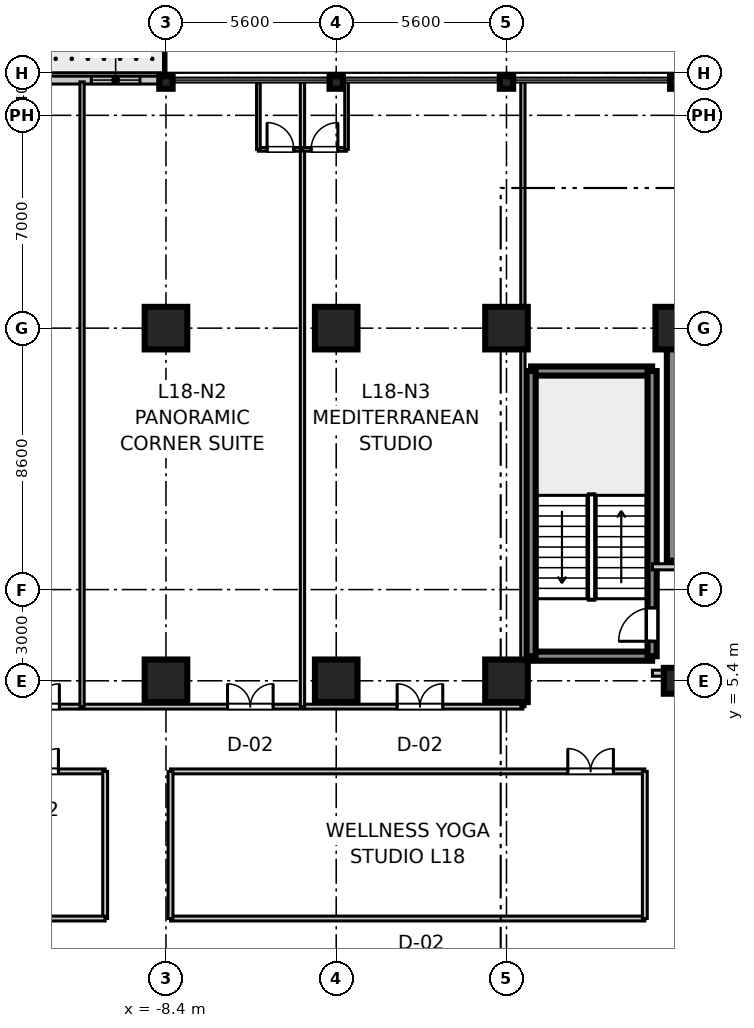
"""IFC4 building model, lengths in metres.
Left out: names, types, materials, properties, quantities, classifications, styles, units other than length and angle.
Written with IfcOpenShell. Run it as: python <this file> out.ifc"""

import sys

from ifc_helpers import new_model, si_unit, direction, frame, frame_2d, origin, origin_2d, place, context, subcontext, project, spatial, rectangle, i_section, extrude, source, transform, mapped, element, fill, save


model = new_model("IFC4")
c1 = context("Model", 3, precision=1e-05, world=origin(), true_north=direction((0.0, 1.0)))
c2 = subcontext(c1, "Body", "Model", "MODEL_VIEW")
j1 = project(units=[si_unit("LENGTHUNIT", "METRE"), si_unit("PLANEANGLEUNIT", "RADIAN")], contexts=[c1])
p1 = place(None, origin())
s1 = spatial("IfcSite", under=j1, at=p1, CompositionType="ELEMENT")
p2 = place(p1, origin())
s2 = spatial("IfcBuilding", under=s1, at=p2, CompositionType="ELEMENT")
p3 = place(p2, frame((0.0, 0.0, 76.2)))
s3 = spatial("IfcBuildingStorey", under=s2, at=p3, CompositionType="ELEMENT", Elevation=76.2)
m1 = source(origin(), c2, "Body", "SweptSolid", [
    extrude(rectangle(XDim=1.4, YDim=1.4, at=origin_2d()), origin(), (0.0, 0.0, 1.0), 3.605),
])
for number, where, z_axis, x_axis in (
    (1, (-8.4, 5.4, 0.0), (0.0, 0.0, 1.0), (1.0, 0.0, 0.0)),
    (2, (-8.4, 17.0, 0.0), (0.0, 0.0, 1.0), (1.0, 0.0, 0.0)),
    (3, (-2.8, 5.4, 0.0), (0.0, 0.0, 1.0), (1.0, 0.0, 0.0)),
    (4, (-2.8, 17.0, 0.0), (0.0, 0.0, 1.0), (1.0, 0.0, 0.0)),
    (5, (2.8, 5.4, 0.0), (0.0, 0.0, 1.0), (1.0, 0.0, 0.0)),
    (6, (2.8, 17.0, 0.0), (0.0, 0.0, 1.0), (1.0, 0.0, 0.0)),
):
    element("IfcColumn", number, at=place(p3, frame(where, z_axis=z_axis, x_axis=x_axis)), inside=s3, PredefinedType="COLUMN", context=c2, shape_type="MappedRepresentation", body=[
        mapped(m1, transform((0.0, 0.0, 0.0), scale=1.0)),
    ])
m2 = source(origin(), c2, "Body", "SweptSolid", [
    extrude(rectangle(XDim=0.85, YDim=0.85, at=origin_2d()), origin(), (0.0, 0.0, 1.0), 3.605),
])
p4 = place(p3, frame((8.4, 5.4, 0.0), z_axis=(0.0, 0.0, 1.0), x_axis=(1.0, 0.0, 0.0)))
e7 = element("IfcColumn", 7, at=p4, inside=s3, PredefinedType="PILASTER", context=c2, shape_type="MappedRepresentation", body=[
    mapped(m2, transform((0.0, 0.0, 0.0), scale=1.0)),
])
p5 = place(p3, frame((8.4, 17.0, 0.0), z_axis=(0.0, 0.0, 1.0), x_axis=(1.0, 0.0, 0.0)))
e8 = element("IfcColumn", 8, at=p5, inside=s3, PredefinedType="COLUMN", context=c2, shape_type="MappedRepresentation", body=[
    mapped(m1, transform((0.0, 0.0, 0.0), scale=1.0)),
])
m3 = source(origin(), c2, "Body", "SweptSolid", [
    extrude(i_section(OverallWidth=0.412, OverallDepth=0.438, WebThickness=0.023, FlangeThickness=0.036, at=origin_2d()), origin(), (0.0, 0.0, 1.0), 3.505),
])
for number, where, z_axis, x_axis in (
    (9, (-8.4, 25.08, 0.0), (0.0, 0.0, 1.0), (0.0, 1.0, 0.0)),
    (10, (-2.8, 25.08, 0.0), (0.0, 0.0, 1.0), (0.0, 1.0, 0.0)),
    (11, (2.8, 25.08, 0.0), (0.0, 0.0, 1.0), (0.0, 1.0, 0.0)),
    (12, (8.4, 25.08, 0.0), (0.0, 0.0, 1.0), (0.0, 1.0, 0.0)),
):
    element("IfcColumn", number, at=place(p3, frame(where, z_axis=z_axis, x_axis=x_axis)), inside=s3, PredefinedType="COLUMN", context=c2, shape_type="MappedRepresentation", body=[
        mapped(m3, transform((0.0, 0.0, 0.0), scale=1.0)),
    ])
m4 = source(origin(), c2, "Body", "SweptSolid", [
    extrude(rectangle(XDim=7.65, YDim=0.65, at=frame_2d((3.825, 0.0))), origin(), (0.0, 0.0, 1.0), 3.37),
])
p6 = place(p3, frame((8.4, 9.35, 0.0), z_axis=(0.0, 0.0, 1.0), x_axis=(0.0, 1.0, 0.0)))
e13 = element("IfcWall", 13, at=p6, inside=s3, PredefinedType="SHEAR", context=c2, shape_type="MappedRepresentation", body=[
    mapped(m4, transform((0.0, 0.0, 0.0), scale=1.0)),
])
m5 = source(origin(), c2, "Body", "SweptSolid", [
    extrude(rectangle(XDim=3.98, YDim=0.3, at=frame_2d((1.99, 0.0))), origin(), (0.0, 0.0, 1.0), 3.37),
])
for number, where, z_axis, x_axis in (
    (14, (3.61, 6.21, 0.0), (0.0, 0.0, 1.0), (1.0, 0.0, 0.0)),
    (15, (3.61, 15.59, 0.0), (0.0, 0.0, 1.0), (1.0, 0.0, 0.0)),
):
    element("IfcWall", number, at=place(p3, frame(where, z_axis=z_axis, x_axis=x_axis)), inside=s3, PredefinedType="SHEAR", context=c2, shape_type="MappedRepresentation", body=[
        mapped(m5, transform((0.0, 0.0, 0.0), scale=1.0)),
    ])
m6 = source(origin(), c2, "Body", "SweptSolid", [
    extrude(rectangle(XDim=9.38, YDim=0.3, at=frame_2d((4.69, 0.0))), origin(), (0.0, 0.0, 1.0), 3.37),
])
p7 = place(p3, frame((3.61, 6.21, 0.0), z_axis=(0.0, 0.0, 1.0), x_axis=(0.0, 1.0, 0.0)))
e16 = element("IfcWall", 16, at=p7, inside=s3, PredefinedType="SHEAR", context=c2, shape_type="MappedRepresentation", body=[
    mapped(m6, transform((0.0, 0.0, 0.0), scale=1.0)),
])
p8 = place(p3, frame((7.59, 6.21, 0.0), z_axis=(0.0, 0.0, 1.0), x_axis=(0.0, 1.0, 0.0)))
e17 = element("IfcWall", 17, at=p8, inside=s3, PredefinedType="SHEAR", context=c2, shape_type="MappedRepresentation", body=[
    mapped(m6, transform((0.0, 0.0, 0.0), scale=1.0)),
])
p9 = place(p8, frame((0.49, 0.0, 0.0)))
e18 = element("IfcOpeningElement", 18, at=p9, cuts=e17, PredefinedType="OPENING", context=c2, shape_type="SweptSolid", body=[
    extrude(rectangle(XDim=1.1, YDim=2.15, at=frame_2d((0.55, 1.075))), frame((0.0, 0.16, 0.0), z_axis=(0.0, -1.0, 0.0), x_axis=(1.0, 0.0, 0.0)), (0.0, 0.0, 1.0), 0.32),
])
m7 = source(origin(), c2, "Body", "SweptSolid", [
    extrude(rectangle(XDim=8.6, YDim=0.26, at=frame_2d((4.3, 0.0))), origin(), (0.0, 0.0, 1.0), 2.85),
])
p10 = place(p3, frame((-17.0, 25.16, 0.0), z_axis=(0.0, 0.0, 1.0), x_axis=(1.0, 0.0, 0.0)))
e19 = element("IfcWall", 19, at=p10, inside=s3, PredefinedType="STANDARD", context=c2, shape_type="MappedRepresentation", body=[
    mapped(m7, transform((0.0, 0.0, 0.0), scale=1.0)),
])
p11 = place(p10, frame((2.295, 0.0, 0.0)))
e20 = element("IfcOpeningElement", 20, at=p11, cuts=e19, PredefinedType="OPENING", context=c2, shape_type="SweptSolid", body=[
    extrude(rectangle(XDim=1.8, YDim=2.25, at=frame_2d((0.9, 1.125))), frame((0.0, 0.14, 0.0), z_axis=(0.0, -1.0, 0.0), x_axis=(1.0, 0.0, 0.0)), (0.0, 0.0, 1.0), 0.28),
])
p12 = place(p10, frame((6.145, 0.0, 0.85)))
e21 = element("IfcOpeningElement", 21, at=p12, cuts=e19, PredefinedType="OPENING", context=c2, shape_type="SweptSolid", body=[
    extrude(rectangle(XDim=1.6, YDim=1.8, at=frame_2d((0.8, 0.9))), frame((0.0, 0.14, 0.0), z_axis=(0.0, -1.0, 0.0), x_axis=(1.0, 0.0, 0.0)), (0.0, 0.0, 1.0), 0.28),
])
m8 = source(origin(), c2, "Body", "SweptSolid", [
    extrude(rectangle(XDim=3.82, YDim=0.2, at=frame_2d((1.91, 0.0))), origin(), (0.0, 0.0, 1.0), 2.71),
])
p13 = place(p3, frame((7.6, 5.65, 0.0), z_axis=(0.0, 0.0, 1.0), x_axis=(1.0, 0.0, 0.0)))
e22 = element("IfcWall", 22, at=p13, inside=s3, PredefinedType="PARTITIONING", context=c2, shape_type="MappedRepresentation", body=[
    mapped(m8, transform((0.0, 0.0, 0.0), scale=1.0)),
])
m9 = source(origin(), c2, "Body", "SweptSolid", [
    extrude(rectangle(XDim=1.9, YDim=0.2, at=frame_2d((0.95, 0.0))), origin(), (0.0, 0.0, 1.0), 2.71),
])
p14 = place(p3, frame((7.6, 9.15, 0.0), z_axis=(0.0, 0.0, 1.0), x_axis=(1.0, 0.0, 0.0)))
e23 = element("IfcWall", 23, at=p14, inside=s3, PredefinedType="PARTITIONING", context=c2, shape_type="MappedRepresentation", body=[
    mapped(m9, transform((0.0, 0.0, 0.0), scale=1.0)),
])
m10 = source(origin(), c2, "Body", "SweptSolid", [
    extrude(rectangle(XDim=25.7, YDim=0.16, at=frame_2d((12.85, 0.0))), origin(), (0.0, 0.0, 1.0), 2.71),
])
p15 = place(p3, frame((-22.36, 4.55, 0.0), z_axis=(0.0, 0.0, 1.0), x_axis=(1.0, 0.0, 0.0)))
e24 = element("IfcWall", 24, at=p15, inside=s3, PredefinedType="PARTITIONING", context=c2, shape_type="MappedRepresentation", body=[
    mapped(m10, transform((0.0, 0.0, 0.0), scale=1.0)),
])
p16 = place(p15, frame((8.954, 0.0, 0.0)))
e25 = element("IfcOpeningElement", 25, at=p16, cuts=e24, PredefinedType="OPENING", context=c2, shape_type="SweptSolid", body=[
    extrude(rectangle(XDim=1.5, YDim=2.15, at=frame_2d((0.75, 1.075))), frame((0.0, 0.09, 0.0), z_axis=(0.0, -1.0, 0.0), x_axis=(1.0, 0.0, 0.0)), (0.0, 0.0, 1.0), 0.18),
])
p17 = place(p15, frame((15.985, 0.0, 0.0)))
e26 = element("IfcOpeningElement", 26, at=p17, cuts=e24, PredefinedType="OPENING", context=c2, shape_type="SweptSolid", body=[
    extrude(rectangle(XDim=1.5, YDim=2.15, at=frame_2d((0.75, 1.075))), frame((0.0, 0.09, 0.0), z_axis=(0.0, -1.0, 0.0), x_axis=(1.0, 0.0, 0.0)), (0.0, 0.0, 1.0), 0.18),
])
p18 = place(p15, frame((21.564, 0.0, 0.0)))
e27 = element("IfcOpeningElement", 27, at=p18, cuts=e24, PredefinedType="OPENING", context=c2, shape_type="SweptSolid", body=[
    extrude(rectangle(XDim=1.5, YDim=2.15, at=frame_2d((0.75, 1.075))), frame((0.0, 0.09, 0.0), z_axis=(0.0, -1.0, 0.0), x_axis=(1.0, 0.0, 0.0)), (0.0, 0.0, 1.0), 0.18),
])
m11 = source(origin(), c2, "Body", "SweptSolid", [
    extrude(rectangle(XDim=20.55, YDim=0.14, at=frame_2d((10.275, 0.0))), origin(), (0.0, 0.0, 1.0), 2.71),
])
for number, where, z_axis, x_axis in (
    (28, (3.34, 4.55, 0.0), (0.0, 0.0, 1.0), (0.0, 1.0, 0.0)),
    (29, (-11.16, 4.55, 0.0), (0.0, 0.0, 1.0), (0.0, 1.0, 0.0)),
):
    element("IfcWall", number, at=place(p3, frame(where, z_axis=z_axis, x_axis=x_axis)), inside=s3, PredefinedType="PARTITIONING", context=c2, shape_type="MappedRepresentation", body=[
        mapped(m11, transform((0.0, 0.0, 0.0), scale=1.0)),
    ])
m12 = source(origin(), c2, "Body", "SweptSolid", [
    extrude(rectangle(XDim=1.45, YDim=0.12, at=frame_2d((0.725, 0.0))), origin(), (0.0, 0.0, 1.0), 2.71),
])
p19 = place(p3, frame((-5.36, 22.88, 0.0), z_axis=(0.0, 0.0, 1.0), x_axis=(1.0, 0.0, 0.0)))
e30 = element("IfcWall", 30, at=p19, inside=s3, PredefinedType="PARTITIONING", context=c2, shape_type="MappedRepresentation", body=[
    mapped(m12, transform((0.0, 0.0, 0.0), scale=1.0)),
])
p20 = place(p19, frame((0.285, 0.0, 0.0)))
e31 = element("IfcOpeningElement", 31, at=p20, cuts=e30, PredefinedType="OPENING", context=c2, shape_type="SweptSolid", body=[
    extrude(rectangle(XDim=0.88, YDim=2.1, at=frame_2d((0.44, 1.05))), frame((0.0, 0.07, 0.0), z_axis=(0.0, -1.0, 0.0), x_axis=(1.0, 0.0, 0.0)), (0.0, 0.0, 1.0), 0.14),
])
m13 = source(origin(), c2, "Body", "SweptSolid", [
    extrude(rectangle(XDim=2.22, YDim=0.12, at=frame_2d((1.11, 0.0))), origin(), (0.0, 0.0, 1.0), 2.71),
])
p21 = place(p3, frame((-5.36, 22.88, 0.0), z_axis=(0.0, 0.0, 1.0), x_axis=(0.0, 1.0, 0.0)))
e32 = element("IfcWall", 32, at=p21, inside=s3, PredefinedType="PARTITIONING", context=c2, shape_type="MappedRepresentation", body=[
    mapped(m13, transform((0.0, 0.0, 0.0), scale=1.0)),
])
p22 = place(p3, frame((-3.91, 4.55, 0.0), z_axis=(0.0, 0.0, 1.0), x_axis=(0.0, 1.0, 0.0)))
e33 = element("IfcWall", 33, at=p22, inside=s3, PredefinedType="PARTITIONING", context=c2, shape_type="MappedRepresentation", body=[
    mapped(m11, transform((0.0, 0.0, 0.0), scale=1.0)),
])
m14 = source(origin(), c2, "Body", "SweptSolid", [
    extrude(rectangle(XDim=1.45, YDim=0.12, at=frame_2d((0.725, 0.0))), origin(), (0.0, 0.0, 1.0), 2.71),
])
p23 = place(p3, frame((-3.91, 22.88, 0.0), z_axis=(0.0, 0.0, 1.0), x_axis=(1.0, 0.0, 0.0)))
e34 = element("IfcWall", 34, at=p23, inside=s3, PredefinedType="PARTITIONING", context=c2, shape_type="MappedRepresentation", body=[
    mapped(m14, transform((0.0, 0.0, 0.0), scale=1.0)),
])
p24 = place(p23, frame((0.285, 0.0, 0.0)))
e35 = element("IfcOpeningElement", 35, at=p24, cuts=e34, PredefinedType="OPENING", context=c2, shape_type="SweptSolid", body=[
    extrude(rectangle(XDim=0.88, YDim=2.1, at=frame_2d((0.44, 1.05))), frame((0.0, 0.07, 0.0), z_axis=(0.0, -1.0, 0.0), x_axis=(1.0, 0.0, 0.0)), (0.0, 0.0, 1.0), 0.14),
])
p25 = place(p3, frame((-2.46, 22.88, 0.0), z_axis=(0.0, 0.0, 1.0), x_axis=(0.0, 1.0, 0.0)))
e36 = element("IfcWall", 36, at=p25, inside=s3, PredefinedType="PARTITIONING", context=c2, shape_type="MappedRepresentation", body=[
    mapped(m13, transform((0.0, 0.0, 0.0), scale=1.0)),
])
m15 = source(origin(), c2, "Body", "SweptSolid", [
    extrude(rectangle(XDim=14.7, YDim=0.16, at=frame_2d((7.35, 0.0))), origin(), (0.0, 0.0, 1.0), 2.71),
])
p26 = place(p3, frame((-25.1, 2.42, 0.0), z_axis=(0.0, 0.0, 1.0), x_axis=(1.0, 0.0, 0.0)))
e37 = element("IfcWall", 37, at=p26, inside=s3, PredefinedType="PARTITIONING", context=c2, shape_type="MappedRepresentation", body=[
    mapped(m15, transform((0.0, 0.0, 0.0), scale=1.0)),
])
p27 = place(p26, frame((11.663, 0.0, 0.0)))
e38 = element("IfcOpeningElement", 38, at=p27, cuts=e37, PredefinedType="OPENING", context=c2, shape_type="SweptSolid", body=[
    extrude(rectangle(XDim=1.5, YDim=2.15, at=frame_2d((0.75, 1.075))), frame((0.0, 0.09, 0.0), z_axis=(0.0, -1.0, 0.0), x_axis=(1.0, 0.0, 0.0)), (0.0, 0.0, 1.0), 0.18),
])
m16 = source(origin(), c2, "Body", "SweptSolid", [
    extrude(rectangle(XDim=4.84, YDim=0.16, at=frame_2d((2.42, 0.0))), origin(), (0.0, 0.0, 1.0), 2.71),
])
p28 = place(p3, frame((-10.4, -2.42, 0.0), z_axis=(0.0, 0.0, 1.0), x_axis=(0.0, 1.0, 0.0)))
e39 = element("IfcWall", 39, at=p28, inside=s3, PredefinedType="PARTITIONING", context=c2, shape_type="MappedRepresentation", body=[
    mapped(m16, transform((0.0, 0.0, 0.0), scale=1.0)),
])
p29 = place(p3, frame((-25.1, -2.42, 0.0), z_axis=(0.0, 0.0, 1.0), x_axis=(1.0, 0.0, 0.0)))
e40 = element("IfcWall", 40, at=p29, inside=s3, PredefinedType="PARTITIONING", context=c2, shape_type="MappedRepresentation", body=[
    mapped(m15, transform((0.0, 0.0, 0.0), scale=1.0)),
])
m17 = source(origin(), c2, "Body", "SweptSolid", [
    extrude(rectangle(XDim=15.6, YDim=0.16, at=frame_2d((7.8, 0.0))), origin(), (0.0, 0.0, 1.0), 2.71),
])
p30 = place(p3, frame((-8.25, -2.42, 0.0), z_axis=(0.0, 0.0, 1.0), x_axis=(1.0, 0.0, 0.0)))
e41 = element("IfcWall", 41, at=p30, inside=s3, PredefinedType="PARTITIONING", context=c2, shape_type="MappedRepresentation", body=[
    mapped(m17, transform((0.0, 0.0, 0.0), scale=1.0)),
])
p31 = place(p3, frame((-8.25, 2.42, 0.0), z_axis=(0.0, 0.0, 1.0), x_axis=(1.0, 0.0, 0.0)))
e42 = element("IfcWall", 42, at=p31, inside=s3, PredefinedType="PARTITIONING", context=c2, shape_type="MappedRepresentation", body=[
    mapped(m17, transform((0.0, 0.0, 0.0), scale=1.0)),
])
p32 = place(p31, frame((13.067, 0.0, 0.0)))
e43 = element("IfcOpeningElement", 43, at=p32, cuts=e42, PredefinedType="OPENING", context=c2, shape_type="SweptSolid", body=[
    extrude(rectangle(XDim=1.5, YDim=2.15, at=frame_2d((0.75, 1.075))), frame((0.0, 0.09, 0.0), z_axis=(0.0, -1.0, 0.0), x_axis=(1.0, 0.0, 0.0)), (0.0, 0.0, 1.0), 0.18),
])
for number, where, z_axis, x_axis in (
    (44, (-8.25, -2.42, 0.0), (0.0, 0.0, 1.0), (0.0, 1.0, 0.0)),
    (45, (7.35, -2.42, 0.0), (0.0, 0.0, 1.0), (0.0, 1.0, 0.0)),
):
    element("IfcWall", number, at=place(p3, frame(where, z_axis=z_axis, x_axis=x_axis)), inside=s3, PredefinedType="PARTITIONING", context=c2, shape_type="MappedRepresentation", body=[
        mapped(m16, transform((0.0, 0.0, 0.0), scale=1.0)),
    ])
m18 = source(origin(), c2, "Body", "SweptSolid", [
    extrude(rectangle(XDim=1.1, YDim=2.15, at=frame_2d((0.55, 1.075))), frame((0.0, 0.025, 0.0), z_axis=(0.0, -1.0, 0.0), x_axis=(1.0, 0.0, 0.0)), (0.0, 0.0, 1.0), 0.05),
])
p33 = place(p9, origin())
e46 = element("IfcDoor", 46, at=p33, inside=s3, OperationType="SINGLE_SWING_LEFT", PredefinedType="DOOR", context=c2, shape_type="MappedRepresentation", body=[
    mapped(m18, transform((0.0, 0.0, 0.0), scale=1.0)),
])
fill(e18, e46)
m19 = source(origin(), c2, "Body", "SweptSolid", [
    extrude(rectangle(XDim=1.5, YDim=2.15, at=frame_2d((0.75, 1.075))), frame((0.0, 0.025, 0.0), z_axis=(0.0, -1.0, 0.0), x_axis=(1.0, 0.0, 0.0)), (0.0, 0.0, 1.0), 0.05),
])
p34 = place(p16, origin())
e47 = element("IfcDoor", 47, at=p34, inside=s3, OperationType="DOUBLE_DOOR_SINGLE_SWING", PredefinedType="DOOR", context=c2, shape_type="MappedRepresentation", body=[
    mapped(m19, transform((0.0, 0.0, 0.0), scale=1.0)),
])
fill(e25, e47)
m20 = source(origin(), c2, "Body", "SweptSolid", [
    extrude(rectangle(XDim=0.88, YDim=2.1, at=frame_2d((0.44, 1.05))), frame((0.0, 0.025, 0.0), z_axis=(0.0, -1.0, 0.0), x_axis=(1.0, 0.0, 0.0)), (0.0, 0.0, 1.0), 0.05),
])
p35 = place(p20, origin())
e48 = element("IfcDoor", 48, at=p35, inside=s3, OperationType="SINGLE_SWING_LEFT", PredefinedType="DOOR", context=c2, shape_type="MappedRepresentation", body=[
    mapped(m20, transform((0.0, 0.0, 0.0), scale=1.0)),
])
fill(e31, e48)
p36 = place(p17, origin())
e49 = element("IfcDoor", 49, at=p36, inside=s3, OperationType="DOUBLE_DOOR_SINGLE_SWING", PredefinedType="DOOR", context=c2, shape_type="MappedRepresentation", body=[
    mapped(m19, transform((0.0, 0.0, 0.0), scale=1.0)),
])
fill(e26, e49)
p37 = place(p24, origin())
e50 = element("IfcDoor", 50, at=p37, inside=s3, OperationType="SINGLE_SWING_RIGHT", PredefinedType="DOOR", context=c2, shape_type="MappedRepresentation", body=[
    mapped(m20, transform((0.0, 0.0, 0.0), scale=1.0)),
])
fill(e35, e50)
p38 = place(p18, origin())
e51 = element("IfcDoor", 51, at=p38, inside=s3, OperationType="DOUBLE_DOOR_SINGLE_SWING", PredefinedType="DOOR", context=c2, shape_type="MappedRepresentation", body=[
    mapped(m19, transform((0.0, 0.0, 0.0), scale=1.0)),
])
fill(e27, e51)
p39 = place(p27, origin())
e52 = element("IfcDoor", 52, at=p39, inside=s3, OperationType="DOUBLE_DOOR_SINGLE_SWING", PredefinedType="DOOR", context=c2, shape_type="MappedRepresentation", body=[
    mapped(m19, transform((0.0, 0.0, 0.0), scale=1.0)),
])
fill(e38, e52)
p40 = place(p32, frame((1.5, 0.0, 0.0), z_axis=(0.0, 0.0, 1.0), x_axis=(-1.0, 0.0, 0.0)))
e53 = element("IfcDoor", 53, at=p40, inside=s3, OperationType="DOUBLE_DOOR_SINGLE_SWING", PredefinedType="DOOR", context=c2, shape_type="MappedRepresentation", body=[
    mapped(m19, transform((0.0, 0.0, 0.0), scale=1.0)),
])
fill(e43, e53)
m21 = source(origin(), c2, "Body", "SweptSolid", [
    extrude(rectangle(XDim=1.6, YDim=1.8, at=frame_2d((0.8, 0.9))), frame((0.0, 0.03, 0.0), z_axis=(0.0, -1.0, 0.0), x_axis=(1.0, 0.0, 0.0)), (0.0, 0.0, 1.0), 0.06),
])
p41 = place(p12, origin())
e54 = element("IfcWindow", 54, at=p41, inside=s3, PartitioningType="SINGLE_PANEL", PredefinedType="WINDOW", context=c2, shape_type="MappedRepresentation", body=[
    mapped(m21, transform((0.0, 0.0, 0.0), scale=1.0)),
])
fill(e21, e54)
save(model, sys.argv[1])
